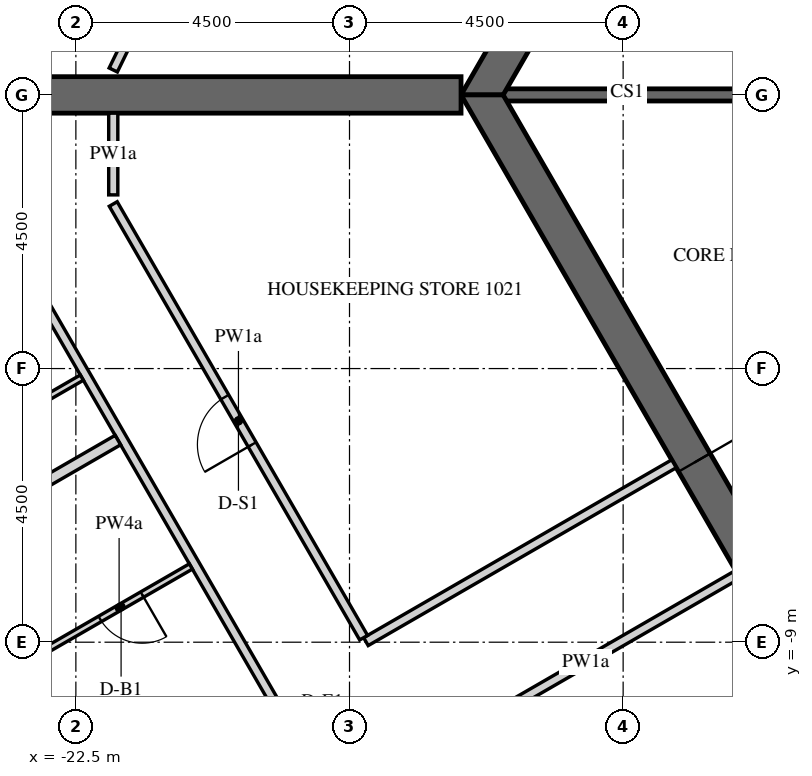
"""IFC4 building model, lengths in metres.
Left out: names, types, materials, properties, quantities, classifications, styles, units other than length and angle.
Written with IfcOpenShell. Run it as: python <this file> out.ifc"""

import sys

from ifc_helpers import new_model, si_unit, direction, frame, frame_2d, origin, place, context, subcontext, project, spatial, polyline, rectangle, outline, extrude, element, fill, save


model = new_model("IFC4")
c1 = context("Model", 3, precision=1e-05, world=origin(), true_north=direction((0.0, 1.0)))
c2 = subcontext(c1, "Body", "Model", "MODEL_VIEW")
j1 = project(units=[si_unit("LENGTHUNIT", "METRE"), si_unit("PLANEANGLEUNIT", "RADIAN")], contexts=[c1])
p1 = place(None, origin())
s1 = spatial("IfcSite", under=j1, at=p1, CompositionType="ELEMENT")
p2 = place(p1, origin())
s2 = spatial("IfcBuilding", under=s1, at=p2, CompositionType="ELEMENT")
p3 = place(p2, frame((0.0, 0.0, 142.8)))
s3 = spatial("IfcBuildingStorey", under=s2, at=p3, CompositionType="ELEMENT", Elevation=142.8)
p4 = place(p3, frame((-19.595, 27.633, -0.15), z_axis=(0.0, 0.0, 1.0), x_axis=(-0.438368285794, -0.898795441694, 0.0)))
e1 = element("IfcWall", 1, at=p4, inside=s3, PredefinedType="SOLIDWALL", context=c2, shape_type="SweptSolid", body=[
    extrude(outline(polyline([(-0.026, -0.275), (30.093, -0.275), (30.048, 0.275), (0.026, 0.275), (-0.026, -0.275)])), origin(), (0.0, 0.0, 1.0), 3.75),
])
p5 = place(p4, frame((1.236, 0.0, 1.05)))
e2 = element("IfcOpeningElement", 2, at=p5, cuts=e1, PredefinedType="OPENING", context=c2, shape_type="SweptSolid", body=[
    extrude(rectangle(XDim=2.4, YDim=2.4, at=frame_2d((1.2, 1.2))), frame((0.0, 0.285, 0.0), z_axis=(0.0, -1.0, 0.0), x_axis=(1.0, 0.0, 0.0)), (0.0, 0.0, 1.0), 0.57),
])
p6 = place(p4, frame((4.835, 0.0, 1.05)))
e3 = element("IfcOpeningElement", 3, at=p6, cuts=e1, PredefinedType="OPENING", context=c2, shape_type="SweptSolid", body=[
    extrude(rectangle(XDim=2.4, YDim=2.4, at=frame_2d((1.2, 1.2))), frame((0.0, 0.285, 0.0), z_axis=(0.0, -1.0, 0.0), x_axis=(1.0, 0.0, 0.0)), (0.0, 0.0, 1.0), 0.57),
])
p7 = place(p4, frame((8.436, 0.0, 1.05)))
e4 = element("IfcOpeningElement", 4, at=p7, cuts=e1, PredefinedType="OPENING", context=c2, shape_type="SweptSolid", body=[
    extrude(rectangle(XDim=2.4, YDim=2.4, at=frame_2d((1.2, 1.2))), frame((0.0, 0.285, 0.0), z_axis=(0.0, -1.0, 0.0), x_axis=(1.0, 0.0, 0.0)), (0.0, 0.0, 1.0), 0.57),
])
p8 = place(p4, frame((12.035, 0.0, 1.05)))
e5 = element("IfcOpeningElement", 5, at=p8, cuts=e1, PredefinedType="OPENING", context=c2, shape_type="SweptSolid", body=[
    extrude(rectangle(XDim=2.4, YDim=2.4, at=frame_2d((1.2, 1.2))), frame((0.0, 0.285, 0.0), z_axis=(0.0, -1.0, 0.0), x_axis=(1.0, 0.0, 0.0)), (0.0, 0.0, 1.0), 0.57),
])
p9 = place(p4, frame((15.635, 0.0, 1.05)))
e6 = element("IfcOpeningElement", 6, at=p9, cuts=e1, PredefinedType="OPENING", context=c2, shape_type="SweptSolid", body=[
    extrude(rectangle(XDim=2.4, YDim=2.4, at=frame_2d((1.2, 1.2))), frame((0.0, 0.285, 0.0), z_axis=(0.0, -1.0, 0.0), x_axis=(1.0, 0.0, 0.0)), (0.0, 0.0, 1.0), 0.57),
])
p10 = place(p4, frame((19.236, 0.0, 1.05)))
e7 = element("IfcOpeningElement", 7, at=p10, cuts=e1, PredefinedType="OPENING", context=c2, shape_type="SweptSolid", body=[
    extrude(rectangle(XDim=2.4, YDim=2.4, at=frame_2d((1.2, 1.2))), frame((0.0, 0.285, 0.0), z_axis=(0.0, -1.0, 0.0), x_axis=(1.0, 0.0, 0.0)), (0.0, 0.0, 1.0), 0.57),
])
p11 = place(p4, frame((22.835, 0.0, 1.05)))
e8 = element("IfcOpeningElement", 8, at=p11, cuts=e1, PredefinedType="OPENING", context=c2, shape_type="SweptSolid", body=[
    extrude(rectangle(XDim=2.4, YDim=2.4, at=frame_2d((1.2, 1.2))), frame((0.0, 0.285, 0.0), z_axis=(0.0, -1.0, 0.0), x_axis=(1.0, 0.0, 0.0)), (0.0, 0.0, 1.0), 0.57),
])
p12 = place(p4, frame((26.436, 0.0, 1.05)))
e9 = element("IfcOpeningElement", 9, at=p12, cuts=e1, PredefinedType="OPENING", context=c2, shape_type="SweptSolid", body=[
    extrude(rectangle(XDim=2.4, YDim=2.4, at=frame_2d((1.2, 1.2))), frame((0.0, 0.285, 0.0), z_axis=(0.0, -1.0, 0.0), x_axis=(1.0, 0.0, 0.0)), (0.0, 0.0, 1.0), 0.57),
])
p13 = place(p3, frame((-32.655, -2.89, -0.15), z_axis=(0.0, 0.0, 1.0), x_axis=(0.499997711317, -0.866026725152, 0.0)))
e10 = element("IfcWall", 10, at=p13, inside=s3, PredefinedType="SOLIDWALL", context=c2, shape_type="SweptSolid", body=[
    extrude(outline(polyline([(-0.022, -0.275), (30.097, -0.275), (30.045, 0.275), (0.022, 0.275), (-0.022, -0.275)])), origin(), (0.0, 0.0, 1.0), 3.75),
])
p14 = place(p13, frame((1.236, 0.0, 1.05)))
e11 = element("IfcOpeningElement", 11, at=p14, cuts=e10, PredefinedType="OPENING", context=c2, shape_type="SweptSolid", body=[
    extrude(rectangle(XDim=2.4, YDim=2.4, at=frame_2d((1.2, 1.2))), frame((0.0, 0.285, 0.0), z_axis=(0.0, -1.0, 0.0), x_axis=(1.0, 0.0, 0.0)), (0.0, 0.0, 1.0), 0.57),
])
p15 = place(p13, frame((4.835, 0.0, 1.05)))
e12 = element("IfcOpeningElement", 12, at=p15, cuts=e10, PredefinedType="OPENING", context=c2, shape_type="SweptSolid", body=[
    extrude(rectangle(XDim=2.4, YDim=2.4, at=frame_2d((1.2, 1.2))), frame((0.0, 0.285, 0.0), z_axis=(0.0, -1.0, 0.0), x_axis=(1.0, 0.0, 0.0)), (0.0, 0.0, 1.0), 0.57),
])
p16 = place(p13, frame((8.436, 0.0, 1.05)))
e13 = element("IfcOpeningElement", 13, at=p16, cuts=e10, PredefinedType="OPENING", context=c2, shape_type="SweptSolid", body=[
    extrude(rectangle(XDim=2.4, YDim=2.4, at=frame_2d((1.2, 1.2))), frame((0.0, 0.285, 0.0), z_axis=(0.0, -1.0, 0.0), x_axis=(1.0, 0.0, 0.0)), (0.0, 0.0, 1.0), 0.57),
])
p17 = place(p13, frame((12.035, 0.0, 1.05)))
e14 = element("IfcOpeningElement", 14, at=p17, cuts=e10, PredefinedType="OPENING", context=c2, shape_type="SweptSolid", body=[
    extrude(rectangle(XDim=2.4, YDim=2.4, at=frame_2d((1.2, 1.2))), frame((0.0, 0.285, 0.0), z_axis=(0.0, -1.0, 0.0), x_axis=(1.0, 0.0, 0.0)), (0.0, 0.0, 1.0), 0.57),
])
p18 = place(p13, frame((15.635, 0.0, 1.05)))
e15 = element("IfcOpeningElement", 15, at=p18, cuts=e10, PredefinedType="OPENING", context=c2, shape_type="SweptSolid", body=[
    extrude(rectangle(XDim=2.4, YDim=2.4, at=frame_2d((1.2, 1.2))), frame((0.0, 0.285, 0.0), z_axis=(0.0, -1.0, 0.0), x_axis=(1.0, 0.0, 0.0)), (0.0, 0.0, 1.0), 0.57),
])
p19 = place(p13, frame((19.236, 0.0, 1.05)))
e16 = element("IfcOpeningElement", 16, at=p19, cuts=e10, PredefinedType="OPENING", context=c2, shape_type="SweptSolid", body=[
    extrude(rectangle(XDim=2.4, YDim=2.4, at=frame_2d((1.2, 1.2))), frame((0.0, 0.285, 0.0), z_axis=(0.0, -1.0, 0.0), x_axis=(1.0, 0.0, 0.0)), (0.0, 0.0, 1.0), 0.57),
])
p20 = place(p13, frame((22.835, 0.0, 1.05)))
e17 = element("IfcOpeningElement", 17, at=p20, cuts=e10, PredefinedType="OPENING", context=c2, shape_type="SweptSolid", body=[
    extrude(rectangle(XDim=2.4, YDim=2.4, at=frame_2d((1.2, 1.2))), frame((0.0, 0.285, 0.0), z_axis=(0.0, -1.0, 0.0), x_axis=(1.0, 0.0, 0.0)), (0.0, 0.0, 1.0), 0.57),
])
p21 = place(p13, frame((26.436, 0.0, 1.05)))
e18 = element("IfcOpeningElement", 18, at=p21, cuts=e10, PredefinedType="OPENING", context=c2, shape_type="SweptSolid", body=[
    extrude(rectangle(XDim=2.4, YDim=2.4, at=frame_2d((1.2, 1.2))), frame((0.0, 0.285, 0.0), z_axis=(0.0, -1.0, 0.0), x_axis=(1.0, 0.0, 0.0)), (0.0, 0.0, 1.0), 0.57),
])
p22 = place(p3, frame((-7.91, 13.7, -0.15), z_axis=(0.0, 0.0, 1.0), x_axis=(-0.499999880136, -0.866025472988, 0.0)))
e19 = element("IfcWall", 19, at=p22, inside=s3, PredefinedType="SHEAR", context=c2, shape_type="SweptSolid", body=[
    extrude(outline(polyline([(-0.173, -0.3), (15.993, -0.3), (15.646, 0.3), (0.173, 0.3), (-0.173, -0.3)])), origin(), (0.0, 0.0, 1.0), 3.75),
])
p23 = place(p22, frame((7.039, 0.0, 0.15)))
e20 = element("IfcOpeningElement", 20, at=p23, cuts=e19, PredefinedType="OPENING", context=c2, shape_type="SweptSolid", body=[
    extrude(rectangle(XDim=1.8, YDim=2.4, at=frame_2d((0.9, 1.2))), frame((0.0, 0.31, 0.0), z_axis=(0.0, -1.0, 0.0), x_axis=(1.0, 0.0, 0.0)), (0.0, 0.0, 1.0), 0.62),
])
p24 = place(p3, frame((-15.819, 0.0, -0.15), z_axis=(0.0, 0.0, 1.0), x_axis=(0.499999880136, -0.866025472988, 0.0)))
e21 = element("IfcWall", 21, at=p24, inside=s3, PredefinedType="SHEAR", context=c2, shape_type="SweptSolid", body=[
    extrude(outline(polyline([(-0.173, -0.3), (15.993, -0.3), (15.646, 0.3), (0.173, 0.3), (-0.173, -0.3)])), origin(), (0.0, 0.0, 1.0), 3.75),
])
p25 = place(p24, frame((6.981, 0.0, 0.15)))
e22 = element("IfcOpeningElement", 22, at=p25, cuts=e21, PredefinedType="OPENING", context=c2, shape_type="SweptSolid", body=[
    extrude(rectangle(XDim=1.8, YDim=2.4, at=frame_2d((0.9, 1.2))), frame((0.0, 0.31, 0.0), z_axis=(0.0, -1.0, 0.0), x_axis=(1.0, 0.0, 0.0)), (0.0, 0.0, 1.0), 0.62),
])
p26 = place(p3, frame((-16.166, 0.0, -0.15), z_axis=(0.0, 0.0, 1.0), x_axis=(-1.0, 0.0, 0.0)))
e23 = element("IfcWall", 23, at=p26, inside=s3, PredefinedType="SHEAR", context=c2, shape_type="SweptSolid", body=[
    extrude(rectangle(XDim=16.509, YDim=0.6, at=frame_2d((8.254, 0.0))), origin(), (0.0, 0.0, 1.0), 3.75),
])
p27 = place(p26, frame((7.354, 0.0, 0.15)))
e24 = element("IfcOpeningElement", 24, at=p27, cuts=e23, PredefinedType="OPENING", context=c2, shape_type="SweptSolid", body=[
    extrude(rectangle(XDim=1.8, YDim=2.4, at=frame_2d((0.9, 1.2))), frame((0.0, 0.31, 0.0), z_axis=(0.0, -1.0, 0.0), x_axis=(1.0, 0.0, 0.0)), (0.0, 0.0, 1.0), 0.62),
])
p28 = place(p3, frame((-11.547, 0.0, -0.15), z_axis=(0.0, 0.0, 1.0), x_axis=(-1.0, 0.0, 0.0)))
e25 = element("IfcWall", 25, at=p28, inside=s3, PredefinedType="SHEAR", context=c2, shape_type="SweptSolid", body=[
    extrude(rectangle(XDim=3.926, YDim=0.2, at=frame_2d((1.963, 0.0))), origin(), (0.0, 0.0, 1.0), 3.75),
])
p29 = place(p3, frame((-21.885, 0.41, 0.0), z_axis=(0.0, 0.0, 1.0), x_axis=(0.43837064471, 0.898794291179, 0.0)))
e26 = element("IfcWall", 26, at=p29, inside=s3, PredefinedType="PARTITIONING", context=c2, shape_type="SweptSolid", body=[
    extrude(rectangle(XDim=9.532, YDim=0.15, at=frame_2d((4.766, 0.0))), origin(), (0.0, 0.0, 1.0), 2.838),
])
p30 = place(p29, frame((4.316, 0.0, 0.0)))
e27 = element("IfcOpeningElement", 27, at=p30, cuts=e26, PredefinedType="OPENING", context=c2, shape_type="SweptSolid", body=[
    extrude(rectangle(XDim=0.9, YDim=2.1, at=frame_2d((0.45, 1.05))), frame((0.0, 0.085, 0.0), z_axis=(0.0, -1.0, 0.0), x_axis=(1.0, 0.0, 0.0)), (0.0, 0.0, 1.0), 0.17),
])
p31 = place(p3, frame((-23.743, -2.175, 0.0), z_axis=(0.0, 0.0, 1.0), x_axis=(0.499992353047, -0.86602981871, 0.0)))
e28 = element("IfcWall", 28, at=p31, inside=s3, PredefinedType="PARTITIONING", context=c2, shape_type="SweptSolid", body=[
    extrude(rectangle(XDim=23.516, YDim=0.15, at=frame_2d((11.758, 0.0))), origin(), (0.0, 0.0, 1.0), 2.838),
])
p32 = place(p31, frame((10.099, 0.0, 0.0)))
e29 = element("IfcOpeningElement", 29, at=p32, cuts=e28, PredefinedType="OPENING", context=c2, shape_type="SweptSolid", body=[
    extrude(rectangle(XDim=1.0, YDim=2.1, at=frame_2d((0.5, 1.05))), frame((0.0, 0.085, 0.0), z_axis=(0.0, -1.0, 0.0), x_axis=(1.0, 0.0, 0.0)), (0.0, 0.0, 1.0), 0.17),
])
p33 = place(p31, frame((17.358, 0.0, 0.0)))
e30 = element("IfcOpeningElement", 30, at=p33, cuts=e28, PredefinedType="OPENING", context=c2, shape_type="SweptSolid", body=[
    extrude(rectangle(XDim=1.0, YDim=2.1, at=frame_2d((0.5, 1.05))), frame((0.0, 0.085, 0.0), z_axis=(0.0, -1.0, 0.0), x_axis=(1.0, 0.0, 0.0)), (0.0, 0.0, 1.0), 0.17),
])
p34 = place(p3, frame((-12.664, -6.066, 0.0), z_axis=(0.0, 0.0, 1.0), x_axis=(-0.866018092707, -0.500012662943, 0.0)))
e31 = element("IfcWall", 31, at=p34, inside=s3, PredefinedType="PARTITIONING", context=c2, shape_type="SweptSolid", body=[
    extrude(rectangle(XDim=5.85, YDim=0.15, at=frame_2d((2.925, 0.0))), origin(), (0.0, 0.0, 1.0), 2.838),
])
p35 = place(p3, frame((-17.768, -8.926, 0.0), z_axis=(0.0, 0.0, 1.0), x_axis=(-0.499997033681, 0.866027116383, 0.0)))
e32 = element("IfcWall", 32, at=p35, inside=s3, PredefinedType="PARTITIONING", context=c2, shape_type="SweptSolid", body=[
    extrude(rectangle(XDim=8.235, YDim=0.15, at=frame_2d((4.118, 0.0))), origin(), (0.0, 0.0, 1.0), 2.838),
])
p36 = place(p35, frame((3.668, 0.0, 0.0)))
e33 = element("IfcOpeningElement", 33, at=p36, cuts=e32, PredefinedType="OPENING", context=c2, shape_type="SweptSolid", body=[
    extrude(rectangle(XDim=0.9, YDim=2.1, at=frame_2d((0.45, 1.05))), frame((0.0, 0.085, 0.0), z_axis=(0.0, -1.0, 0.0), x_axis=(1.0, 0.0, 0.0)), (0.0, 0.0, 1.0), 0.17),
])
p37 = place(p3, frame((-21.885, -1.644, 0.0), z_axis=(0.0, 0.0, 1.0), x_axis=(0.0, 1.0, 0.0)))
e34 = element("IfcWall", 34, at=p37, inside=s3, PredefinedType="PARTITIONING", context=c2, shape_type="SweptSolid", body=[
    extrude(rectangle(XDim=1.344, YDim=0.15, at=frame_2d((0.672, 0.0))), origin(), (0.0, 0.0, 1.0), 2.838),
])
p38 = place(p3, frame((-16.615, -10.772, 0.0), z_axis=(0.0, 0.0, 1.0), x_axis=(0.866025774745, 0.499999357477, 0.0)))
e35 = element("IfcWall", 35, at=p38, inside=s3, PredefinedType="PARTITIONING", context=c2, shape_type="SweptSolid", body=[
    extrude(rectangle(XDim=5.775, YDim=0.15, at=frame_2d((2.887, 0.0))), origin(), (0.0, 0.0, 1.0), 2.838),
])
p39 = place(p3, frame((-22.402, -4.649, 0.0), z_axis=(0.0, 0.0, 1.0), x_axis=(-0.865989585315, -0.500062034277, 0.0)))
e36 = element("IfcWall", 36, at=p39, inside=s3, PredefinedType="PARTITIONING", context=c2, shape_type="SweptSolid", body=[
    extrude(rectangle(XDim=2.925, YDim=0.1, at=frame_2d((1.462, 0.0))), origin(), (0.0, 0.0, 1.0), 2.838),
])
p40 = place(p39, frame((1.175, 0.0, 0.0)))
e37 = element("IfcOpeningElement", 37, at=p40, cuts=e36, PredefinedType="OPENING", context=c2, shape_type="SweptSolid", body=[
    extrude(rectangle(XDim=0.8, YDim=2.1, at=frame_2d((0.4, 1.05))), frame((0.0, 0.06, 0.0), z_axis=(0.0, -1.0, 0.0), x_axis=(1.0, 0.0, 0.0)), (0.0, 0.0, 1.0), 0.12),
])
p41 = place(p3, frame((-28.499, -9.538, 0.0), z_axis=(0.0, 0.0, 1.0), x_axis=(0.866040859435, 0.499973229072, 0.0)))
e38 = element("IfcWall", 38, at=p41, inside=s3, PredefinedType="PARTITIONING", context=c2, shape_type="SweptSolid", body=[
    extrude(rectangle(XDim=7.725, YDim=0.18, at=frame_2d((3.863, 0.0))), origin(), (0.0, 0.0, 1.0), 2.838),
])
p42 = place(p3, frame((-20.609, -7.754, 0.0), z_axis=(0.0, 0.0, 1.0), x_axis=(-0.866012511928, -0.500022328685, 0.0)))
e39 = element("IfcWall", 39, at=p42, inside=s3, PredefinedType="PARTITIONING", context=c2, shape_type="SweptSolid", body=[
    extrude(rectangle(XDim=2.725, YDim=0.1, at=frame_2d((1.363, 0.0))), origin(), (0.0, 0.0, 1.0), 2.838),
])
p43 = place(p42, frame((0.925, 0.0, 0.0)))
e40 = element("IfcOpeningElement", 40, at=p43, cuts=e39, PredefinedType="OPENING", context=c2, shape_type="SweptSolid", body=[
    extrude(rectangle(XDim=0.8, YDim=2.1, at=frame_2d((0.4, 1.05))), frame((0.0, 0.06, 0.0), z_axis=(0.0, -1.0, 0.0), x_axis=(1.0, 0.0, 0.0)), (0.0, 0.0, 1.0), 0.12),
])
p44 = place(p25, origin())
e41 = element("IfcDoor", 41, at=p44, inside=s3, OperationType="DOUBLE_DOOR_SINGLE_SWING", PredefinedType="DOOR", context=c2, shape_type="SweptSolid", body=[
    extrude(rectangle(XDim=1.8, YDim=2.4, at=frame_2d((0.9, 1.2))), frame((0.0, 0.025, 0.0), z_axis=(0.0, -1.0, 0.0), x_axis=(1.0, 0.0, 0.0)), (0.0, 0.0, 1.0), 0.05),
])
fill(e22, e41)
p45 = place(p43, origin())
e42 = element("IfcDoor", 42, at=p45, inside=s3, OperationType="SINGLE_SWING_RIGHT", PredefinedType="DOOR", context=c2, shape_type="SweptSolid", body=[
    extrude(rectangle(XDim=0.8, YDim=2.1, at=frame_2d((0.4, 1.05))), frame((0.0, 0.025, 0.0), z_axis=(0.0, -1.0, 0.0), x_axis=(1.0, 0.0, 0.0)), (0.0, 0.0, 1.0), 0.05),
])
fill(e40, e42)
p46 = place(p36, origin())
e43 = element("IfcDoor", 43, at=p46, inside=s3, OperationType="SINGLE_SWING_RIGHT", PredefinedType="DOOR", context=c2, shape_type="SweptSolid", body=[
    extrude(rectangle(XDim=0.9, YDim=2.1, at=frame_2d((0.45, 1.05))), frame((0.0, 0.025, 0.0), z_axis=(0.0, -1.0, 0.0), x_axis=(1.0, 0.0, 0.0)), (0.0, 0.0, 1.0), 0.05),
])
fill(e33, e43)
save(model, sys.argv[1])
